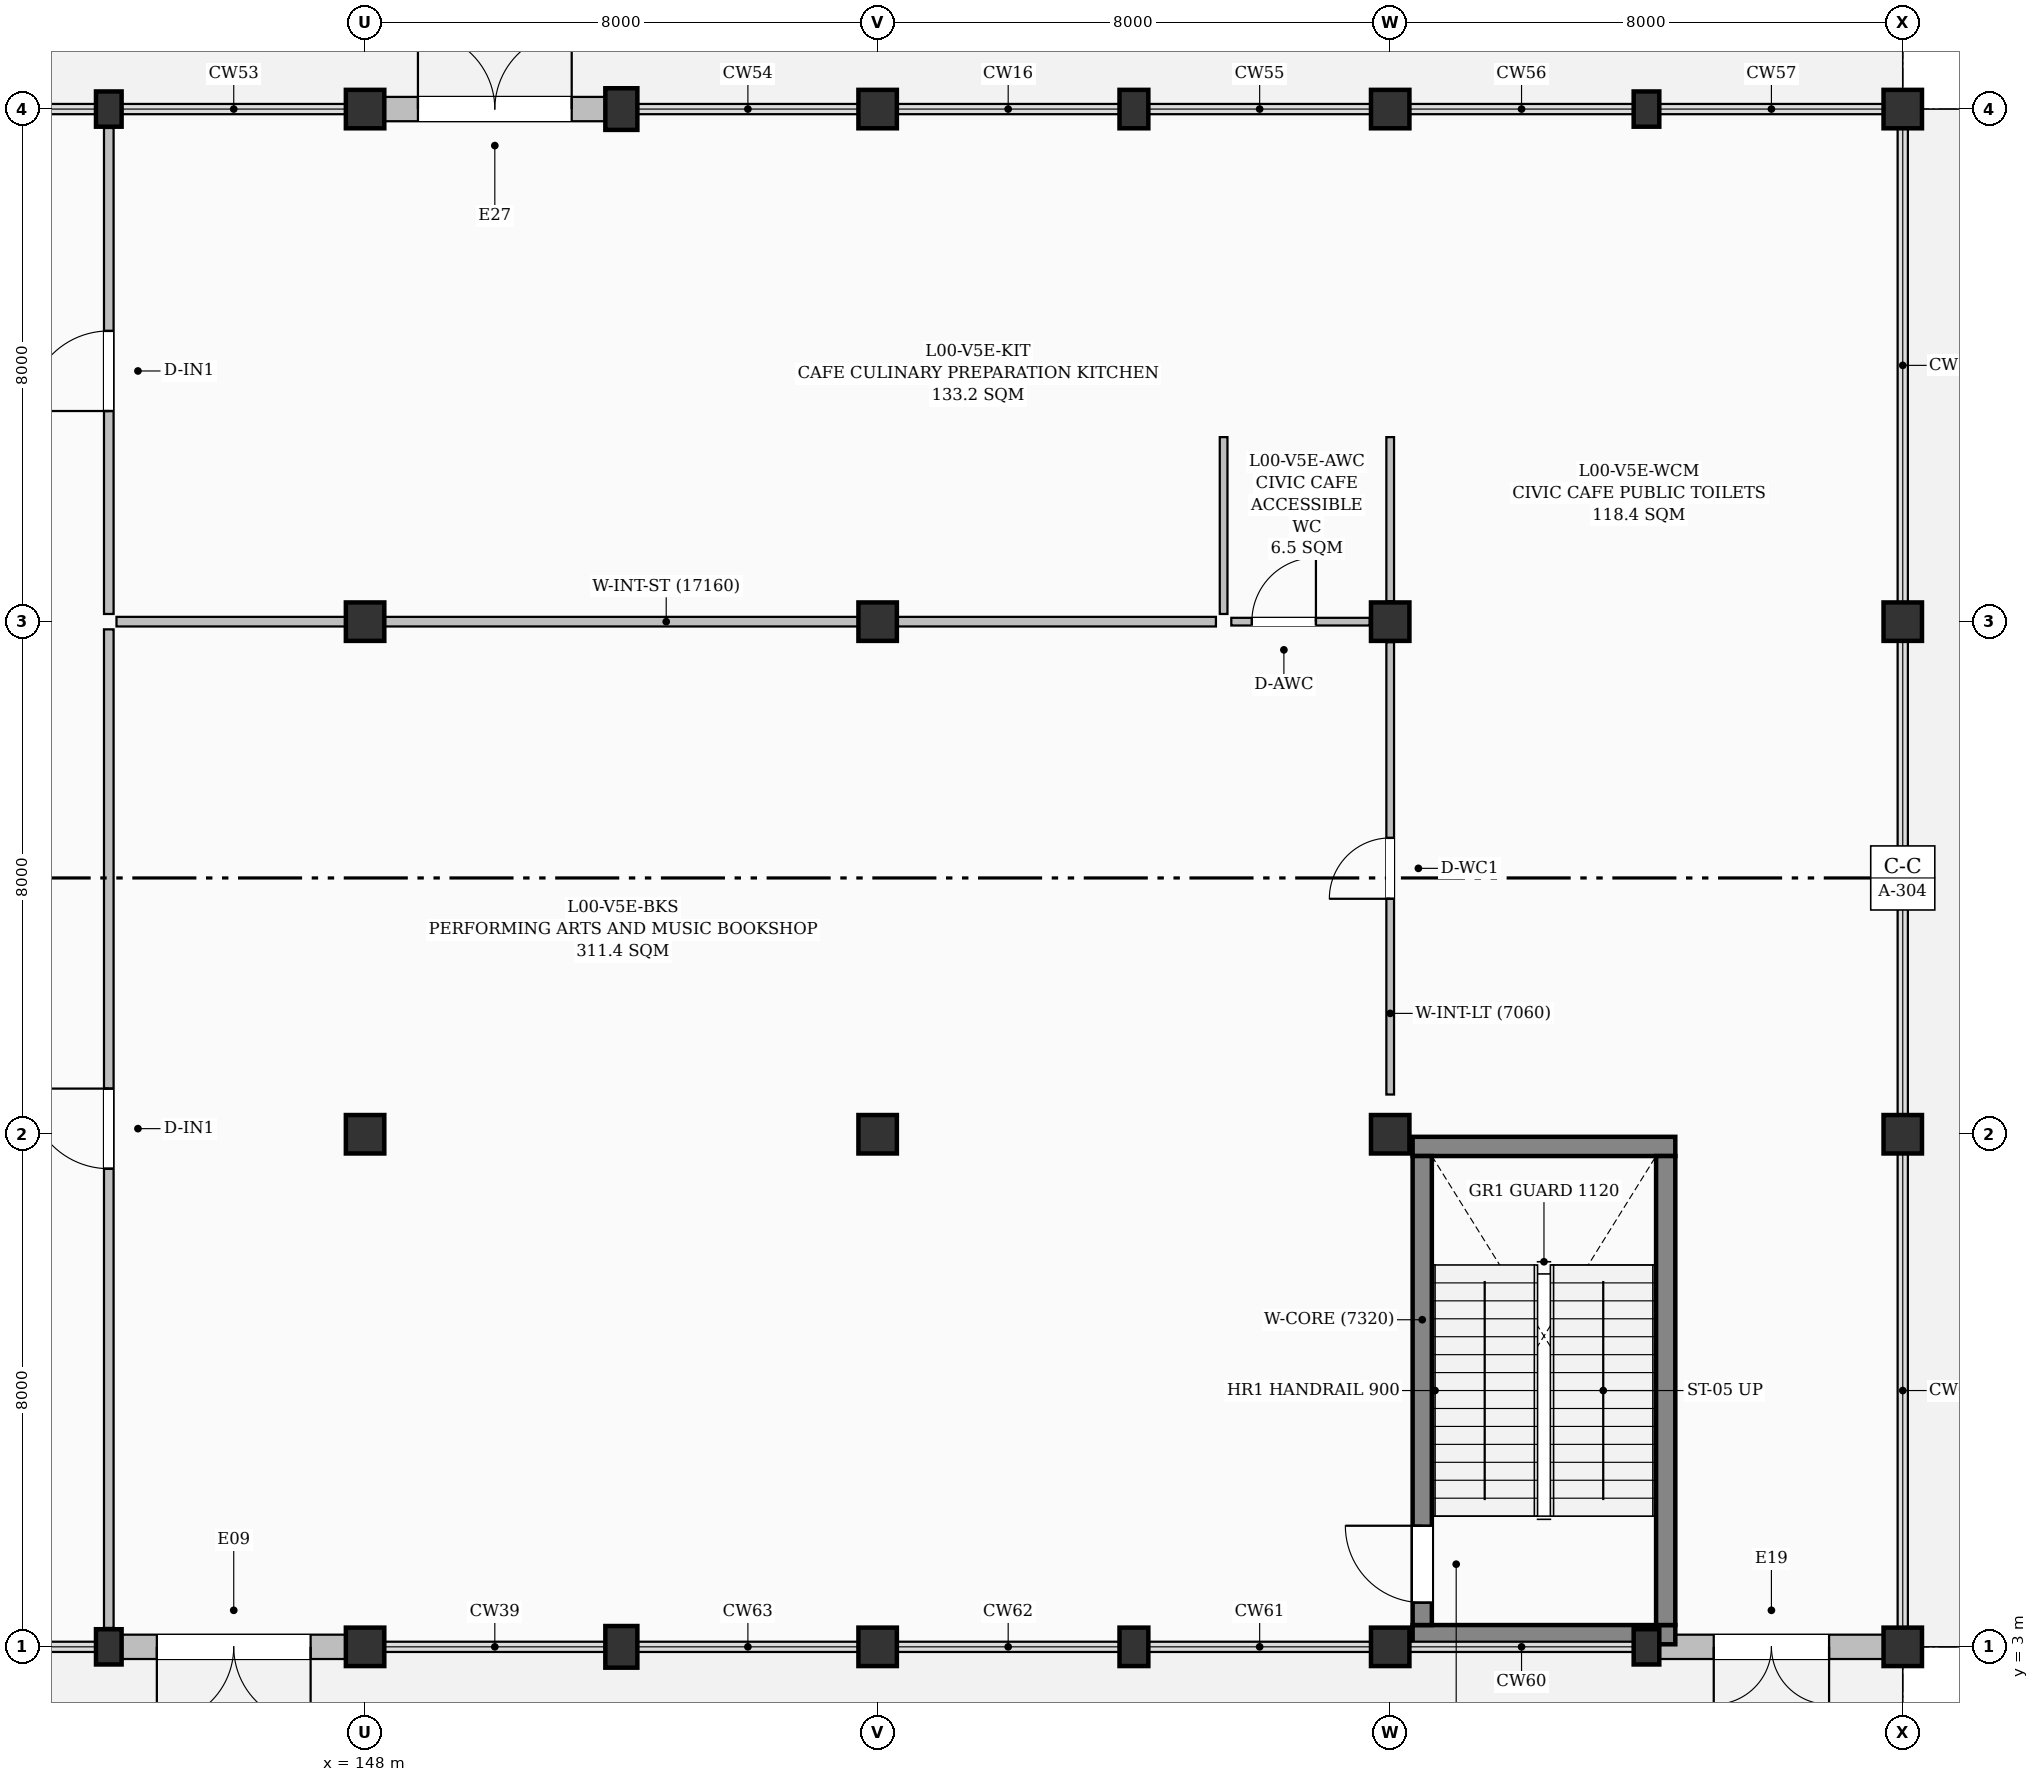
"""IFC4 building model, lengths in metres.
Left out: names, types, materials, properties, quantities, classifications, styles, units other than length and angle.
Written with IfcOpenShell. Run it as: python <this file> out.ifc"""

import sys

from ifc_helpers import new_model, si_unit, direction, frame, frame_2d, origin, origin_2d, place, context, subcontext, project, spatial, rectangle, circle, extrude, element, fill, save


model = new_model("IFC4")
c1 = context("Model", 3, precision=1e-05, world=origin(), true_north=direction((0.0, 1.0)))
c2 = subcontext(c1, "Body", "Model", "MODEL_VIEW")
j1 = project(units=[si_unit("LENGTHUNIT", "METRE"), si_unit("PLANEANGLEUNIT", "RADIAN")], contexts=[c1])
p1 = place(None, origin())
s1 = spatial("IfcSite", under=j1, at=p1, CompositionType="ELEMENT")
p2 = place(p1, origin())
s2 = spatial("IfcBuilding", under=s1, at=p2, CompositionType="ELEMENT")
p3 = place(p2, origin())
s3 = spatial("IfcBuildingStorey", under=s2, at=p3, CompositionType="ELEMENT", Elevation=0.0)
for number, where, z_axis, x_axis in (
    (1, (144.0, 3.0, 0.0), (0.0, 0.0, 1.0), (1.0, 0.0, 0.0)),
    (2, (144.0, 27.0, 0.0), (0.0, 0.0, 1.0), (1.0, 0.0, 0.0)),
):
    element("IfcColumn", number, at=place(p3, frame(where, z_axis=z_axis, x_axis=x_axis)), inside=s3, PredefinedType="PILASTER", context=c2, shape_type="SweptSolid", body=[
        extrude(rectangle(XDim=0.4, YDim=0.55, at=origin_2d()), origin(), (0.0, 0.0, 1.0), 4.8),
    ])
p4 = place(p3, frame((148.0, 3.0, 0.0), z_axis=(0.0, 0.0, 1.0), x_axis=(1.0, 0.0, 0.0)))
e3 = element("IfcColumn", 3, at=p4, inside=s3, PredefinedType="COLUMN", context=c2, shape_type="SweptSolid", body=[
    extrude(circle(Radius=0.3, at=origin_2d()), origin(), (0.0, 0.0, 1.0), 4.8),
])
for number, where, z_axis, x_axis in (
    (4, (148.0, 11.0, 0.0), (0.0, 0.0, 1.0), (1.0, 0.0, 0.0)),
    (5, (148.0, 19.0, 0.0), (0.0, 0.0, 1.0), (1.0, 0.0, 0.0)),
    (6, (148.0, 27.0, 0.0), (0.0, 0.0, 1.0), (1.0, 0.0, 0.0)),
):
    element("IfcColumn", number, at=place(p3, frame(where, z_axis=z_axis, x_axis=x_axis)), inside=s3, PredefinedType="COLUMN", context=c2, shape_type="SweptSolid", body=[
        extrude(rectangle(XDim=0.6, YDim=0.6, at=origin_2d()), origin(), (0.0, 0.0, 1.0), 4.8),
    ])
for number, where, z_axis, x_axis in (
    (7, (152.0, 3.0, 0.0), (0.0, 0.0, 1.0), (1.0, 0.0, 0.0)),
    (8, (152.0, 27.0, 0.0), (0.0, 0.0, 1.0), (1.0, 0.0, 0.0)),
):
    element("IfcColumn", number, at=place(p3, frame(where, z_axis=z_axis, x_axis=x_axis)), inside=s3, PredefinedType="PILASTER", context=c2, shape_type="SweptSolid", body=[
        extrude(rectangle(XDim=0.5, YDim=0.65, at=origin_2d()), origin(), (0.0, 0.0, 1.0), 4.8),
    ])
p5 = place(p3, frame((156.0, 3.0, 0.0), z_axis=(0.0, 0.0, 1.0), x_axis=(1.0, 0.0, 0.0)))
e9 = element("IfcColumn", 9, at=p5, inside=s3, PredefinedType="COLUMN", context=c2, shape_type="SweptSolid", body=[
    extrude(circle(Radius=0.3, at=origin_2d()), origin(), (0.0, 0.0, 1.0), 4.8),
])
for number, where, z_axis, x_axis in (
    (10, (156.0, 11.0, 0.0), (0.0, 0.0, 1.0), (1.0, 0.0, 0.0)),
    (11, (156.0, 19.0, 0.0), (0.0, 0.0, 1.0), (1.0, 0.0, 0.0)),
    (12, (156.0, 27.0, 0.0), (0.0, 0.0, 1.0), (1.0, 0.0, 0.0)),
):
    element("IfcColumn", number, at=place(p3, frame(where, z_axis=z_axis, x_axis=x_axis)), inside=s3, PredefinedType="COLUMN", context=c2, shape_type="SweptSolid", body=[
        extrude(rectangle(XDim=0.6, YDim=0.6, at=origin_2d()), origin(), (0.0, 0.0, 1.0), 4.8),
    ])
for number, where, z_axis, x_axis in (
    (13, (160.0, 3.0, 0.0), (0.0, 0.0, 1.0), (1.0, 0.0, 0.0)),
    (14, (160.0, 27.0, 0.0), (0.0, 0.0, 1.0), (1.0, 0.0, 0.0)),
):
    element("IfcColumn", number, at=place(p3, frame(where, z_axis=z_axis, x_axis=x_axis)), inside=s3, PredefinedType="PILASTER", context=c2, shape_type="SweptSolid", body=[
        extrude(rectangle(XDim=0.45, YDim=0.6, at=origin_2d()), origin(), (0.0, 0.0, 1.0), 4.8),
    ])
p6 = place(p3, frame((164.0, 3.0, 0.0), z_axis=(0.0, 0.0, 1.0), x_axis=(1.0, 0.0, 0.0)))
e15 = element("IfcColumn", 15, at=p6, inside=s3, PredefinedType="COLUMN", context=c2, shape_type="SweptSolid", body=[
    extrude(circle(Radius=0.3, at=origin_2d()), origin(), (0.0, 0.0, 1.0), 4.8),
])
for number, where, z_axis, x_axis in (
    (16, (164.0, 11.0, 0.0), (0.0, 0.0, 1.0), (1.0, 0.0, 0.0)),
    (17, (164.0, 19.0, 0.0), (0.0, 0.0, 1.0), (1.0, 0.0, 0.0)),
    (18, (164.0, 27.0, 0.0), (0.0, 0.0, 1.0), (1.0, 0.0, 0.0)),
):
    element("IfcColumn", number, at=place(p3, frame(where, z_axis=z_axis, x_axis=x_axis)), inside=s3, PredefinedType="COLUMN", context=c2, shape_type="SweptSolid", body=[
        extrude(rectangle(XDim=0.6, YDim=0.6, at=origin_2d()), origin(), (0.0, 0.0, 1.0), 4.8),
    ])
for number, where, z_axis, x_axis in (
    (19, (168.0, 3.0, 0.0), (0.0, 0.0, 1.0), (1.0, 0.0, 0.0)),
    (20, (168.0, 27.0, 0.0), (0.0, 0.0, 1.0), (1.0, 0.0, 0.0)),
):
    element("IfcColumn", number, at=place(p3, frame(where, z_axis=z_axis, x_axis=x_axis)), inside=s3, PredefinedType="PILASTER", context=c2, shape_type="SweptSolid", body=[
        extrude(rectangle(XDim=0.4, YDim=0.55, at=origin_2d()), origin(), (0.0, 0.0, 1.0), 4.8),
    ])
for number, where, z_axis, x_axis in (
    (21, (172.0, 3.0, 0.0), (0.0, 0.0, 1.0), (1.0, 0.0, 0.0)),
    (22, (172.0, 11.0, 0.0), (0.0, 0.0, 1.0), (1.0, 0.0, 0.0)),
    (23, (172.0, 19.0, 0.0), (0.0, 0.0, 1.0), (1.0, 0.0, 0.0)),
    (24, (172.0, 27.0, 0.0), (0.0, 0.0, 1.0), (1.0, 0.0, 0.0)),
):
    element("IfcColumn", number, at=place(p3, frame(where, z_axis=z_axis, x_axis=x_axis)), inside=s3, PredefinedType="COLUMN", context=c2, shape_type="SweptSolid", body=[
        extrude(rectangle(XDim=0.6, YDim=0.6, at=origin_2d()), origin(), (0.0, 0.0, 1.0), 4.8),
    ])
p7 = place(p3, frame((148.3, 27.0, 0.0), z_axis=(0.0, 0.0, 1.0), x_axis=(1.0, 0.0, 0.0)))
e25 = element("IfcWall", 25, at=p7, inside=s3, PredefinedType="SOLIDWALL", context=c2, shape_type="SweptSolid", body=[
    extrude(rectangle(XDim=3.45, YDim=0.38, at=frame_2d((1.725, 0.0))), origin(), (0.0, 0.0, 1.0), 4.035),
])
p8 = place(p7, frame((0.525, 0.0, 0.0)))
e26 = element("IfcOpeningElement", 26, at=p8, cuts=e25, PredefinedType="OPENING", context=c2, shape_type="SweptSolid", body=[
    extrude(rectangle(XDim=2.4, YDim=2.4, at=frame_2d((1.2, 1.2))), frame((0.0, 0.2, 0.0), z_axis=(0.0, -1.0, 0.0), x_axis=(1.0, 0.0, 0.0)), (0.0, 0.0, 1.0), 0.4),
])
p9 = place(p3, frame((171.7, 3.0, 0.0), z_axis=(0.0, 0.0, 1.0), x_axis=(-1.0, 0.0, 0.0)))
e27 = element("IfcWall", 27, at=p9, inside=s3, PredefinedType="SOLIDWALL", context=c2, shape_type="SweptSolid", body=[
    extrude(rectangle(XDim=3.5, YDim=0.38, at=frame_2d((1.75, 0.0))), origin(), (0.0, 0.0, 1.0), 4.035),
])
p10 = place(p9, frame((0.85, 0.0, 0.0)))
e28 = element("IfcOpeningElement", 28, at=p10, cuts=e27, PredefinedType="OPENING", context=c2, shape_type="SweptSolid", body=[
    extrude(rectangle(XDim=1.8, YDim=2.25, at=frame_2d((0.9, 1.125))), frame((0.0, 0.2, 0.0), z_axis=(0.0, -1.0, 0.0), x_axis=(1.0, 0.0, 0.0)), (0.0, 0.0, 1.0), 0.4),
])
p11 = place(p3, frame((147.7, 3.0, 0.0), z_axis=(0.0, 0.0, 1.0), x_axis=(-1.0, 0.0, 0.0)))
e29 = element("IfcWall", 29, at=p11, inside=s3, PredefinedType="SOLIDWALL", context=c2, shape_type="SweptSolid", body=[
    extrude(rectangle(XDim=3.5, YDim=0.38, at=frame_2d((1.75, 0.0))), origin(), (0.0, 0.0, 1.0), 3.985),
])
p12 = place(p11, frame((0.55, 0.0, 0.0)))
e30 = element("IfcOpeningElement", 30, at=p12, cuts=e29, PredefinedType="OPENING", context=c2, shape_type="SweptSolid", body=[
    extrude(rectangle(XDim=2.4, YDim=2.4, at=frame_2d((1.2, 1.2))), frame((0.0, 0.2, 0.0), z_axis=(0.0, -1.0, 0.0), x_axis=(1.0, 0.0, 0.0)), (0.0, 0.0, 1.0), 0.4),
])
for number, where, z_axis, x_axis in (
    (31, (164.35, 3.19, 0.0), (0.0, 0.0, 1.0), (1.0, 0.0, 0.0)),
    (32, (168.45, 10.81, 0.0), (0.0, 0.0, 1.0), (-1.0, 0.0, 0.0)),
):
    element("IfcWall", number, at=place(p3, frame(where, z_axis=z_axis, x_axis=x_axis)), inside=s3, PredefinedType="SHEAR", context=c2, shape_type="SweptSolid", body=[
        extrude(rectangle(XDim=4.1, YDim=0.3, at=frame_2d((2.05, 0.0))), origin(), (0.0, 0.0, 1.0), 4.55),
    ])
p13 = place(p3, frame((164.5, 3.34, 0.0), z_axis=(0.0, 0.0, 1.0), x_axis=(0.0, 1.0, 0.0)))
e33 = element("IfcWall", 33, at=p13, inside=s3, PredefinedType="SHEAR", context=c2, shape_type="SweptSolid", body=[
    extrude(rectangle(XDim=7.32, YDim=0.3, at=frame_2d((3.66, 0.0))), origin(), (0.0, 0.0, 1.0), 4.55),
])
p14 = place(p13, frame((0.35, 0.0, 0.0)))
e34 = element("IfcOpeningElement", 34, at=p14, cuts=e33, PredefinedType="OPENING", context=c2, shape_type="SweptSolid", body=[
    extrude(rectangle(XDim=1.2, YDim=2.15, at=frame_2d((0.6, 1.075))), frame((0.0, 0.16, 0.0), z_axis=(0.0, -1.0, 0.0), x_axis=(1.0, 0.0, 0.0)), (0.0, 0.0, 1.0), 0.32),
])
p15 = place(p3, frame((168.3, 10.66, 0.0), z_axis=(0.0, 0.0, 1.0), x_axis=(0.0, -1.0, 0.0)))
e35 = element("IfcWall", 35, at=p15, inside=s3, PredefinedType="SHEAR", context=c2, shape_type="SweptSolid", body=[
    extrude(rectangle(XDim=7.32, YDim=0.3, at=frame_2d((3.66, 0.0))), origin(), (0.0, 0.0, 1.0), 4.55),
])
p16 = place(p3, frame((144.0, 3.295, 0.0), z_axis=(0.0, 0.0, 1.0), x_axis=(0.0, 1.0, 0.0)))
e36 = element("IfcWall", 36, at=p16, inside=s3, PredefinedType="PARTITIONING", context=c2, shape_type="SweptSolid", body=[
    extrude(rectangle(XDim=15.585, YDim=0.15, at=frame_2d((7.792, 0.0))), origin(), (0.0, 0.0, 1.0), 4.55),
])
p17 = place(p16, frame((7.167, 0.0, 0.0)))
e37 = element("IfcOpeningElement", 37, at=p17, cuts=e36, PredefinedType="OPENING", context=c2, shape_type="SweptSolid", body=[
    extrude(rectangle(XDim=1.25, YDim=2.15, at=frame_2d((0.625, 1.075))), frame((0.0, 0.085, 0.0), z_axis=(0.0, -1.0, 0.0), x_axis=(1.0, 0.0, 0.0)), (0.0, 0.0, 1.0), 0.17),
])
p18 = place(p3, frame((144.0, 19.12, 0.0), z_axis=(0.0, 0.0, 1.0), x_axis=(0.0, 1.0, 0.0)))
e38 = element("IfcWall", 38, at=p18, inside=s3, PredefinedType="PARTITIONING", context=c2, shape_type="SweptSolid", body=[
    extrude(rectangle(XDim=7.585, YDim=0.15, at=frame_2d((3.792, 0.0))), origin(), (0.0, 0.0, 1.0), 4.55),
])
p19 = place(p18, frame((3.167, 0.0, 0.0)))
e39 = element("IfcOpeningElement", 39, at=p19, cuts=e38, PredefinedType="OPENING", context=c2, shape_type="SweptSolid", body=[
    extrude(rectangle(XDim=1.25, YDim=2.15, at=frame_2d((0.625, 1.075))), frame((0.0, 0.085, 0.0), z_axis=(0.0, -1.0, 0.0), x_axis=(1.0, 0.0, 0.0)), (0.0, 0.0, 1.0), 0.17),
])
p20 = place(p3, frame((144.12, 19.0, 0.0), z_axis=(0.0, 0.0, 1.0), x_axis=(1.0, 0.0, 0.0)))
e40 = element("IfcWall", 40, at=p20, inside=s3, PredefinedType="PARTITIONING", context=c2, shape_type="SweptSolid", body=[
    extrude(rectangle(XDim=17.16, YDim=0.15, at=frame_2d((8.58, 0.0))), origin(), (0.0, 0.0, 1.0), 3.685),
])
p21 = place(p3, frame((161.52, 19.0, 0.0), z_axis=(0.0, 0.0, 1.0), x_axis=(1.0, 0.0, 0.0)))
e41 = element("IfcWall", 41, at=p21, inside=s3, PredefinedType="PARTITIONING", context=c2, shape_type="SweptSolid", body=[
    extrude(rectangle(XDim=2.16, YDim=0.12, at=frame_2d((1.08, 0.0))), origin(), (0.0, 0.0, 1.0), 3.685),
])
p22 = place(p21, frame((0.321, 0.0, 0.0)))
e42 = element("IfcOpeningElement", 42, at=p22, cuts=e41, PredefinedType="OPENING", context=c2, shape_type="SweptSolid", body=[
    extrude(rectangle(XDim=1.0, YDim=2.1, at=frame_2d((0.5, 1.05))), frame((0.0, 0.07, 0.0), z_axis=(0.0, -1.0, 0.0), x_axis=(1.0, 0.0, 0.0)), (0.0, 0.0, 1.0), 0.14),
])
p23 = place(p3, frame((164.0, 11.62, 0.0), z_axis=(0.0, 0.0, 1.0), x_axis=(0.0, 1.0, 0.0)))
e43 = element("IfcWall", 43, at=p23, inside=s3, PredefinedType="PARTITIONING", context=c2, shape_type="SweptSolid", body=[
    extrude(rectangle(XDim=7.06, YDim=0.12, at=frame_2d((3.53, 0.0))), origin(), (0.0, 0.0, 1.0), 3.785),
])
p24 = place(p23, frame((3.055, 0.0, 0.0)))
e44 = element("IfcOpeningElement", 44, at=p24, cuts=e43, PredefinedType="OPENING", context=c2, shape_type="SweptSolid", body=[
    extrude(rectangle(XDim=0.95, YDim=2.1, at=frame_2d((0.475, 1.05))), frame((0.0, 0.07, 0.0), z_axis=(0.0, -1.0, 0.0), x_axis=(1.0, 0.0, 0.0)), (0.0, 0.0, 1.0), 0.14),
])
p25 = place(p3, frame((161.4, 19.12, 0.0), z_axis=(0.0, 0.0, 1.0), x_axis=(0.0, 1.0, 0.0)))
e45 = element("IfcWall", 45, at=p25, inside=s3, PredefinedType="PARTITIONING", context=c2, shape_type="SweptSolid", body=[
    extrude(rectangle(XDim=2.76, YDim=0.12, at=frame_2d((1.38, 0.0))), origin(), (0.0, 0.0, 1.0), 4.55),
])
p26 = place(p3, frame((164.0, 19.32, 0.0), z_axis=(0.0, 0.0, 1.0), x_axis=(0.0, 1.0, 0.0)))
e46 = element("IfcWall", 46, at=p26, inside=s3, PredefinedType="PARTITIONING", context=c2, shape_type="SweptSolid", body=[
    extrude(rectangle(XDim=2.56, YDim=0.12, at=frame_2d((1.28, 0.0))), origin(), (0.0, 0.0, 1.0), 3.685),
])
p27 = place(p8, origin())
e47 = element("IfcDoor", 47, at=p27, inside=s3, OperationType="DOUBLE_DOOR_SINGLE_SWING", PredefinedType="DOOR", context=c2, shape_type="SweptSolid", body=[
    extrude(rectangle(XDim=2.4, YDim=2.4, at=frame_2d((1.2, 1.2))), frame((0.0, 0.025, 0.0), z_axis=(0.0, -1.0, 0.0), x_axis=(1.0, 0.0, 0.0)), (0.0, 0.0, 1.0), 0.05),
])
fill(e26, e47)
p28 = place(p10, origin())
e48 = element("IfcDoor", 48, at=p28, inside=s3, OperationType="DOUBLE_DOOR_SINGLE_SWING", PredefinedType="DOOR", context=c2, shape_type="SweptSolid", body=[
    extrude(rectangle(XDim=1.8, YDim=2.25, at=frame_2d((0.9, 1.125))), frame((0.0, 0.025, 0.0), z_axis=(0.0, -1.0, 0.0), x_axis=(1.0, 0.0, 0.0)), (0.0, 0.0, 1.0), 0.05),
])
fill(e28, e48)
p29 = place(p12, origin())
e49 = element("IfcDoor", 49, at=p29, inside=s3, OperationType="DOUBLE_DOOR_SINGLE_SWING", PredefinedType="DOOR", context=c2, shape_type="SweptSolid", body=[
    extrude(rectangle(XDim=2.4, YDim=2.4, at=frame_2d((1.2, 1.2))), frame((0.0, 0.025, 0.0), z_axis=(0.0, -1.0, 0.0), x_axis=(1.0, 0.0, 0.0)), (0.0, 0.0, 1.0), 0.05),
])
fill(e30, e49)
p30 = place(p14, origin())
e50 = element("IfcDoor", 50, at=p30, inside=s3, OperationType="SINGLE_SWING_RIGHT", PredefinedType="DOOR", context=c2, shape_type="SweptSolid", body=[
    extrude(rectangle(XDim=1.2, YDim=2.15, at=frame_2d((0.6, 1.075))), frame((0.0, 0.025, 0.0), z_axis=(0.0, -1.0, 0.0), x_axis=(1.0, 0.0, 0.0)), (0.0, 0.0, 1.0), 0.05),
])
fill(e34, e50)
p31 = place(p17, origin())
e51 = element("IfcDoor", 51, at=p31, inside=s3, OperationType="SINGLE_SWING_RIGHT", PredefinedType="DOOR", context=c2, shape_type="SweptSolid", body=[
    extrude(rectangle(XDim=1.25, YDim=2.15, at=frame_2d((0.625, 1.075))), frame((0.0, 0.025, 0.0), z_axis=(0.0, -1.0, 0.0), x_axis=(1.0, 0.0, 0.0)), (0.0, 0.0, 1.0), 0.05),
])
fill(e37, e51)
p32 = place(p19, origin())
e52 = element("IfcDoor", 52, at=p32, inside=s3, OperationType="SINGLE_SWING_LEFT", PredefinedType="DOOR", context=c2, shape_type="SweptSolid", body=[
    extrude(rectangle(XDim=1.25, YDim=2.15, at=frame_2d((0.625, 1.075))), frame((0.0, 0.025, 0.0), z_axis=(0.0, -1.0, 0.0), x_axis=(1.0, 0.0, 0.0)), (0.0, 0.0, 1.0), 0.05),
])
fill(e39, e52)
p33 = place(p22, origin())
e53 = element("IfcDoor", 53, at=p33, inside=s3, OperationType="SINGLE_SWING_RIGHT", PredefinedType="DOOR", context=c2, shape_type="SweptSolid", body=[
    extrude(rectangle(XDim=1.0, YDim=2.1, at=frame_2d((0.5, 1.05))), frame((0.0, 0.025, 0.0), z_axis=(0.0, -1.0, 0.0), x_axis=(1.0, 0.0, 0.0)), (0.0, 0.0, 1.0), 0.05),
])
fill(e42, e53)
p34 = place(p24, origin())
e54 = element("IfcDoor", 54, at=p34, inside=s3, OperationType="SINGLE_SWING_LEFT", PredefinedType="DOOR", context=c2, shape_type="SweptSolid", body=[
    extrude(rectangle(XDim=0.95, YDim=2.1, at=frame_2d((0.475, 1.05))), frame((0.0, 0.025, 0.0), z_axis=(0.0, -1.0, 0.0), x_axis=(1.0, 0.0, 0.0)), (0.0, 0.0, 1.0), 0.05),
])
fill(e44, e54)
save(model, sys.argv[1])
